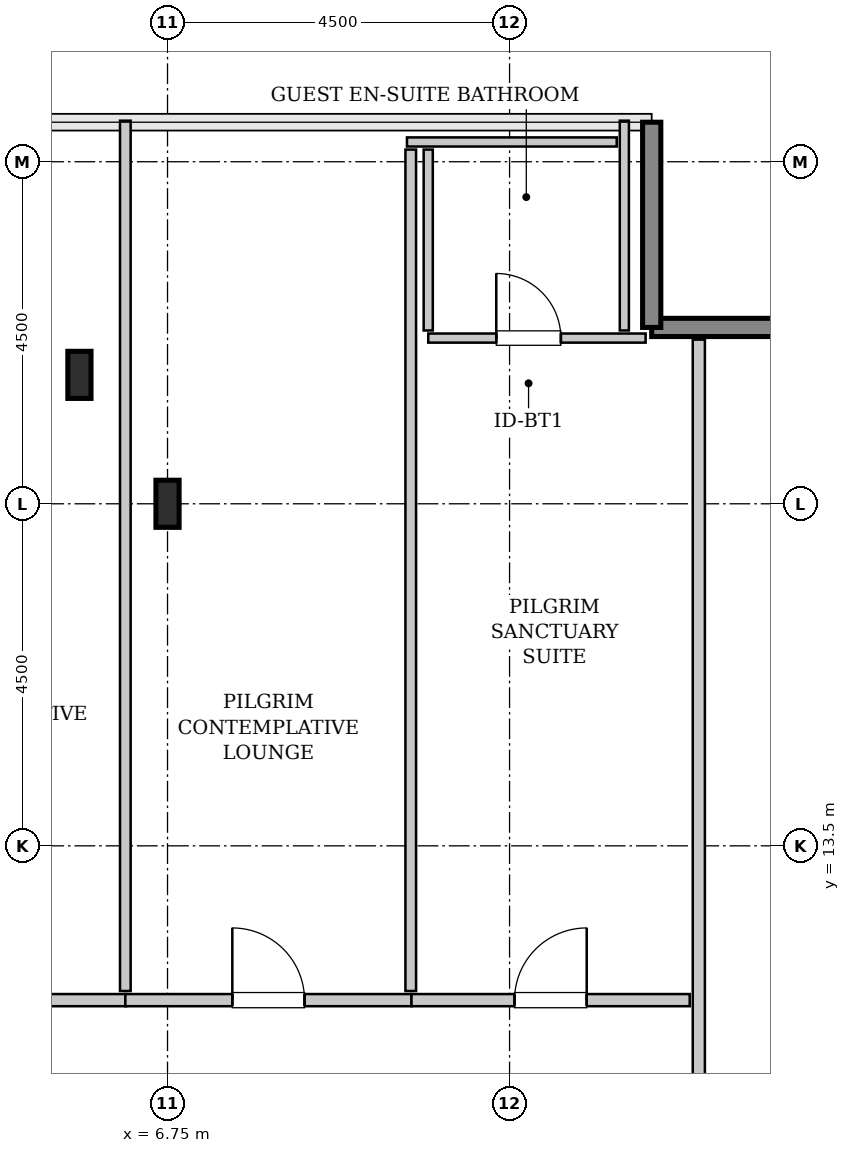
"""IFC4 building model, lengths in metres.
Left out: names, types, materials, properties, quantities, classifications, styles, units other than length and angle.
Written with IfcOpenShell. Run it as: python <this file> out.ifc"""

import sys

from ifc_helpers import new_model, si_unit, direction, frame, frame_2d, origin, origin_2d, place, context, subcontext, project, spatial, rectangle, i_section, extrude, source, transform, mapped, element, fill, save


model = new_model("IFC4")
c1 = context("Model", 3, precision=1e-05, world=origin(), true_north=direction((0.0, 1.0)))
c2 = subcontext(c1, "Body", "Model", "MODEL_VIEW")
j1 = project(units=[si_unit("LENGTHUNIT", "METRE"), si_unit("PLANEANGLEUNIT", "RADIAN")], contexts=[c1])
p1 = place(None, origin())
s1 = spatial("IfcSite", under=j1, at=p1, CompositionType="ELEMENT")
p2 = place(p1, origin())
s2 = spatial("IfcBuilding", under=s1, at=p2, CompositionType="ELEMENT")
p3 = place(p2, frame((0.0, 0.0, 345.2)))
s3 = spatial("IfcBuildingStorey", under=s2, at=p3, CompositionType="ELEMENT", Elevation=345.2)
m1 = source(origin(), c2, "Body", "SweptSolid", [
    extrude(i_section(OverallWidth=0.305, OverallDepth=0.62, WebThickness=0.021, FlangeThickness=0.04, FilletRadius=0.027, at=origin_2d()), origin(), (0.0, 0.0, 1.0), 3.8),
])
for number, where, z_axis, x_axis in (
    (1, (5.591, 19.696, 0.0), (0.0, 0.0, 1.0), (1.0, 0.0, 0.0)),
    (2, (6.75, 18.0, 0.0), (0.0, 0.0, 1.0), (1.0, 0.0, 0.0)),
):
    element("IfcColumn", number, at=place(p3, frame(where, z_axis=z_axis, x_axis=x_axis)), inside=s3, PredefinedType="COLUMN", context=c2, shape_type="MappedRepresentation", body=[
        mapped(m1, transform((0.0, 0.0, 0.0), x_axis=(1.0, 0.0, 0.0), y_axis=(0.0, 1.0, 0.0), z_axis=(0.0, 0.0, 1.0), scale=1.0)),
    ])
m2 = source(origin(), c2, "Body", "SweptSolid", [
    extrude(rectangle(XDim=2.7, YDim=0.24, at=frame_2d((1.35, 0.0))), origin(), (0.0, 0.0, 1.0), 3.5),
])
for number, where, z_axis, x_axis in (
    (3, (15.82, 20.32, 0.0), (0.0, 0.0, 1.0), (-1.0, 0.0, 0.0)),
    (4, (13.12, 20.32, 0.0), (0.0, 0.0, 1.0), (0.0, 1.0, 0.0)),
):
    element("IfcWall", number, at=place(p3, frame(where, z_axis=z_axis, x_axis=x_axis)), inside=s3, PredefinedType="SHEAR", context=c2, shape_type="MappedRepresentation", body=[
        mapped(m2, transform((0.0, 0.0, 0.0), x_axis=(1.0, 0.0, 0.0), y_axis=(0.0, 1.0, 0.0), z_axis=(0.0, 0.0, 1.0), scale=1.0)),
    ])
m3 = source(origin(), c2, "Body", "SweptSolid", [
    extrude(rectangle(XDim=2.86, YDim=0.12, at=frame_2d((1.43, 0.0))), origin(), (0.0, 0.0, 1.0), 3.485),
])
p4 = place(p3, frame((10.18, 20.18, 0.0), z_axis=(0.0, 0.0, 1.0), x_axis=(1.0, 0.0, 0.0)))
e5 = element("IfcWall", 5, at=p4, inside=s3, PredefinedType="PLUMBINGWALL", context=c2, shape_type="MappedRepresentation", body=[
    mapped(m3, transform((0.0, 0.0, 0.0), x_axis=(1.0, 0.0, 0.0), y_axis=(0.0, 1.0, 0.0), z_axis=(0.0, 0.0, 1.0), scale=1.0)),
])
p5 = place(p4, frame((0.895, 0.0, 0.0)))
e6 = element("IfcOpeningElement", 6, at=p5, cuts=e5, PredefinedType="OPENING", context=c2, shape_type="SweptSolid", body=[
    extrude(rectangle(XDim=0.85, YDim=2.1, at=frame_2d((0.425, 1.05))), frame((0.0, 0.07, 0.0), z_axis=(0.0, -1.0, 0.0), x_axis=(1.0, 0.0, 0.0)), (0.0, 0.0, 1.0), 0.14),
])
m4 = source(origin(), c2, "Body", "SweptSolid", [
    extrude(rectangle(XDim=2.76, YDim=0.12, at=frame_2d((1.38, 0.0))), origin(), (0.0, 0.0, 1.0), 3.485),
])
for number, where, z_axis, x_axis in (
    (7, (12.76, 20.28, 0.0), (0.0, 0.0, 1.0), (0.0, 1.0, 0.0)),
    (8, (9.9, 22.76, 0.0), (0.0, 0.0, 1.0), (1.0, 0.0, 0.0)),
):
    element("IfcWall", number, at=place(p3, frame(where, z_axis=z_axis, x_axis=x_axis)), inside=s3, PredefinedType="PLUMBINGWALL", context=c2, shape_type="MappedRepresentation", body=[
        mapped(m4, transform((0.0, 0.0, 0.0), x_axis=(1.0, 0.0, 0.0), y_axis=(0.0, 1.0, 0.0), z_axis=(0.0, 0.0, 1.0), scale=1.0)),
    ])
m5 = source(origin(), c2, "Body", "SweptSolid", [
    extrude(rectangle(XDim=2.38, YDim=0.12, at=frame_2d((1.19, 0.0))), origin(), (0.0, 0.0, 1.0), 3.485),
])
p6 = place(p3, frame((10.18, 20.28, 0.0), z_axis=(0.0, 0.0, 1.0), x_axis=(0.0, 1.0, 0.0)))
e9 = element("IfcWall", 9, at=p6, inside=s3, PredefinedType="PLUMBINGWALL", context=c2, shape_type="MappedRepresentation", body=[
    mapped(m5, transform((0.0, 0.0, 0.0), x_axis=(1.0, 0.0, 0.0), y_axis=(0.0, 1.0, 0.0), z_axis=(0.0, 0.0, 1.0), scale=1.0)),
])
m6 = source(origin(), c2, "Body", "SweptSolid", [
    extrude(rectangle(XDim=12.365, YDim=0.16, at=frame_2d((6.183, 0.0))), origin(), (0.0, 0.0, 1.0), 3.485),
])
p7 = place(p3, frame((13.74, 7.795, 0.0), z_axis=(0.0, 0.0, 1.0), x_axis=(0.0, 1.0, 0.0)))
e10 = element("IfcWall", 10, at=p7, inside=s3, PredefinedType="PARTITIONING", context=c2, shape_type="MappedRepresentation", body=[
    mapped(m6, transform((0.0, 0.0, 0.0), x_axis=(1.0, 0.0, 0.0), y_axis=(0.0, 1.0, 0.0), z_axis=(0.0, 0.0, 1.0), scale=1.0)),
])
p8 = place(p7, frame((1.383, 0.0, 0.0)))
e11 = element("IfcOpeningElement", 11, at=p8, cuts=e10, PredefinedType="OPENING", context=c2, shape_type="SweptSolid", body=[
    extrude(rectangle(XDim=0.95, YDim=2.1, at=frame_2d((0.475, 1.05))), frame((0.0, 0.09, 0.0), z_axis=(0.0, -1.0, 0.0), x_axis=(1.0, 0.0, 0.0)), (0.0, 0.0, 1.0), 0.18),
])
m7 = source(origin(), c2, "Body", "SweptSolid", [
    extrude(rectangle(XDim=3.403, YDim=0.16, at=frame_2d((1.701, 0.0))), origin(), (0.0, 0.0, 1.0), 3.485),
])
p9 = place(p3, frame((2.802, 11.47, 0.0), z_axis=(0.0, 0.0, 1.0), x_axis=(1.0, 0.0, 0.0)))
e12 = element("IfcWall", 12, at=p9, inside=s3, PredefinedType="PARTITIONING", context=c2, shape_type="MappedRepresentation", body=[
    mapped(m7, transform((0.0, 0.0, 0.0), x_axis=(1.0, 0.0, 0.0), y_axis=(0.0, 1.0, 0.0), z_axis=(0.0, 0.0, 1.0), scale=1.0)),
])
p10 = place(p9, frame((1.226, 0.0, 0.0)))
e13 = element("IfcOpeningElement", 13, at=p10, cuts=e12, PredefinedType="OPENING", context=c2, shape_type="SweptSolid", body=[
    extrude(rectangle(XDim=0.95, YDim=2.1, at=frame_2d((0.475, 1.05))), frame((0.0, 0.09, 0.0), z_axis=(0.0, -1.0, 0.0), x_axis=(1.0, 0.0, 0.0)), (0.0, 0.0, 1.0), 0.18),
])
m8 = source(origin(), c2, "Body", "SweptSolid", [
    extrude(rectangle(XDim=11.45, YDim=0.14, at=frame_2d((5.725, 0.0))), origin(), (0.0, 0.0, 1.0), 3.485),
])
p11 = place(p3, frame((6.195, 11.59, 0.0), z_axis=(0.0, 0.0, 1.0), x_axis=(0.0, 1.0, 0.0)))
e14 = element("IfcWall", 14, at=p11, inside=s3, PredefinedType="PARTITIONING", context=c2, shape_type="MappedRepresentation", body=[
    mapped(m8, transform((0.0, 0.0, 0.0), x_axis=(1.0, 0.0, 0.0), y_axis=(0.0, 1.0, 0.0), z_axis=(0.0, 0.0, 1.0), scale=1.0)),
])
m9 = source(origin(), c2, "Body", "SweptSolid", [
    extrude(rectangle(XDim=3.765, YDim=0.16, at=frame_2d((1.882, 0.0))), origin(), (0.0, 0.0, 1.0), 3.485),
])
p12 = place(p3, frame((6.195, 11.47, 0.0), z_axis=(0.0, 0.0, 1.0), x_axis=(1.0, 0.0, 0.0)))
e15 = element("IfcWall", 15, at=p12, inside=s3, PredefinedType="PARTITIONING", context=c2, shape_type="MappedRepresentation", body=[
    mapped(m9, transform((0.0, 0.0, 0.0), x_axis=(1.0, 0.0, 0.0), y_axis=(0.0, 1.0, 0.0), z_axis=(0.0, 0.0, 1.0), scale=1.0)),
])
p13 = place(p12, frame((1.407, 0.0, 0.0)))
e16 = element("IfcOpeningElement", 16, at=p13, cuts=e15, PredefinedType="OPENING", context=c2, shape_type="SweptSolid", body=[
    extrude(rectangle(XDim=0.95, YDim=2.1, at=frame_2d((0.475, 1.05))), frame((0.0, 0.09, 0.0), z_axis=(0.0, -1.0, 0.0), x_axis=(1.0, 0.0, 0.0)), (0.0, 0.0, 1.0), 0.18),
])
m10 = source(origin(), c2, "Body", "SweptSolid", [
    extrude(rectangle(XDim=11.07, YDim=0.14, at=frame_2d((5.535, 0.0))), origin(), (0.0, 0.0, 1.0), 3.485),
])
p14 = place(p3, frame((9.95, 11.59, 0.0), z_axis=(0.0, 0.0, 1.0), x_axis=(0.0, 1.0, 0.0)))
e17 = element("IfcWall", 17, at=p14, inside=s3, PredefinedType="PARTITIONING", context=c2, shape_type="MappedRepresentation", body=[
    mapped(m10, transform((0.0, 0.0, 0.0), x_axis=(1.0, 0.0, 0.0), y_axis=(0.0, 1.0, 0.0), z_axis=(0.0, 0.0, 1.0), scale=1.0)),
])
m11 = source(origin(), c2, "Body", "SweptSolid", [
    extrude(rectangle(XDim=3.66, YDim=0.16, at=frame_2d((1.83, 0.0))), origin(), (0.0, 0.0, 1.0), 3.485),
])
p15 = place(p3, frame((9.96, 11.47, 0.0), z_axis=(0.0, 0.0, 1.0), x_axis=(1.0, 0.0, 0.0)))
e18 = element("IfcWall", 18, at=p15, inside=s3, PredefinedType="PARTITIONING", context=c2, shape_type="MappedRepresentation", body=[
    mapped(m11, transform((0.0, 0.0, 0.0), x_axis=(1.0, 0.0, 0.0), y_axis=(0.0, 1.0, 0.0), z_axis=(0.0, 0.0, 1.0), scale=1.0)),
])
p16 = place(p15, frame((1.355, 0.0, 0.0)))
e19 = element("IfcOpeningElement", 19, at=p16, cuts=e18, PredefinedType="OPENING", context=c2, shape_type="SweptSolid", body=[
    extrude(rectangle(XDim=0.95, YDim=2.1, at=frame_2d((0.475, 1.05))), frame((0.0, 0.09, 0.0), z_axis=(0.0, -1.0, 0.0), x_axis=(1.0, 0.0, 0.0)), (0.0, 0.0, 1.0), 0.18),
])
m12 = source(origin(), c2, "Body", "SweptSolid", [
    extrude(rectangle(XDim=0.85, YDim=2.1, at=frame_2d((0.425, 1.05))), frame((0.0, 0.025, 0.0), z_axis=(0.0, -1.0, 0.0), x_axis=(1.0, 0.0, 0.0)), (0.0, 0.0, 1.0), 0.05),
])
p17 = place(p5, origin())
e20 = element("IfcDoor", 20, at=p17, inside=s3, OperationType="SINGLE_SWING_LEFT", PredefinedType="DOOR", context=c2, shape_type="MappedRepresentation", body=[
    mapped(m12, transform((0.0, 0.0, 0.0), x_axis=(1.0, 0.0, 0.0), y_axis=(0.0, 1.0, 0.0), z_axis=(0.0, 0.0, 1.0), scale=1.0)),
])
fill(e6, e20)
m13 = source(origin(), c2, "Body", "SweptSolid", [
    extrude(rectangle(XDim=0.95, YDim=2.1, at=frame_2d((0.475, 1.05))), frame((0.0, 0.025, 0.0), z_axis=(0.0, -1.0, 0.0), x_axis=(1.0, 0.0, 0.0)), (0.0, 0.0, 1.0), 0.05),
])
p18 = place(p13, origin())
e21 = element("IfcDoor", 21, at=p18, inside=s3, OperationType="SINGLE_SWING_LEFT", PredefinedType="DOOR", context=c2, shape_type="MappedRepresentation", body=[
    mapped(m13, transform((0.0, 0.0, 0.0), x_axis=(1.0, 0.0, 0.0), y_axis=(0.0, 1.0, 0.0), z_axis=(0.0, 0.0, 1.0), scale=1.0)),
])
fill(e16, e21)
p19 = place(p16, origin())
e22 = element("IfcDoor", 22, at=p19, inside=s3, OperationType="SINGLE_SWING_RIGHT", PredefinedType="DOOR", context=c2, shape_type="MappedRepresentation", body=[
    mapped(m13, transform((0.0, 0.0, 0.0), x_axis=(1.0, 0.0, 0.0), y_axis=(0.0, 1.0, 0.0), z_axis=(0.0, 0.0, 1.0), scale=1.0)),
])
fill(e19, e22)
save(model, sys.argv[1])
